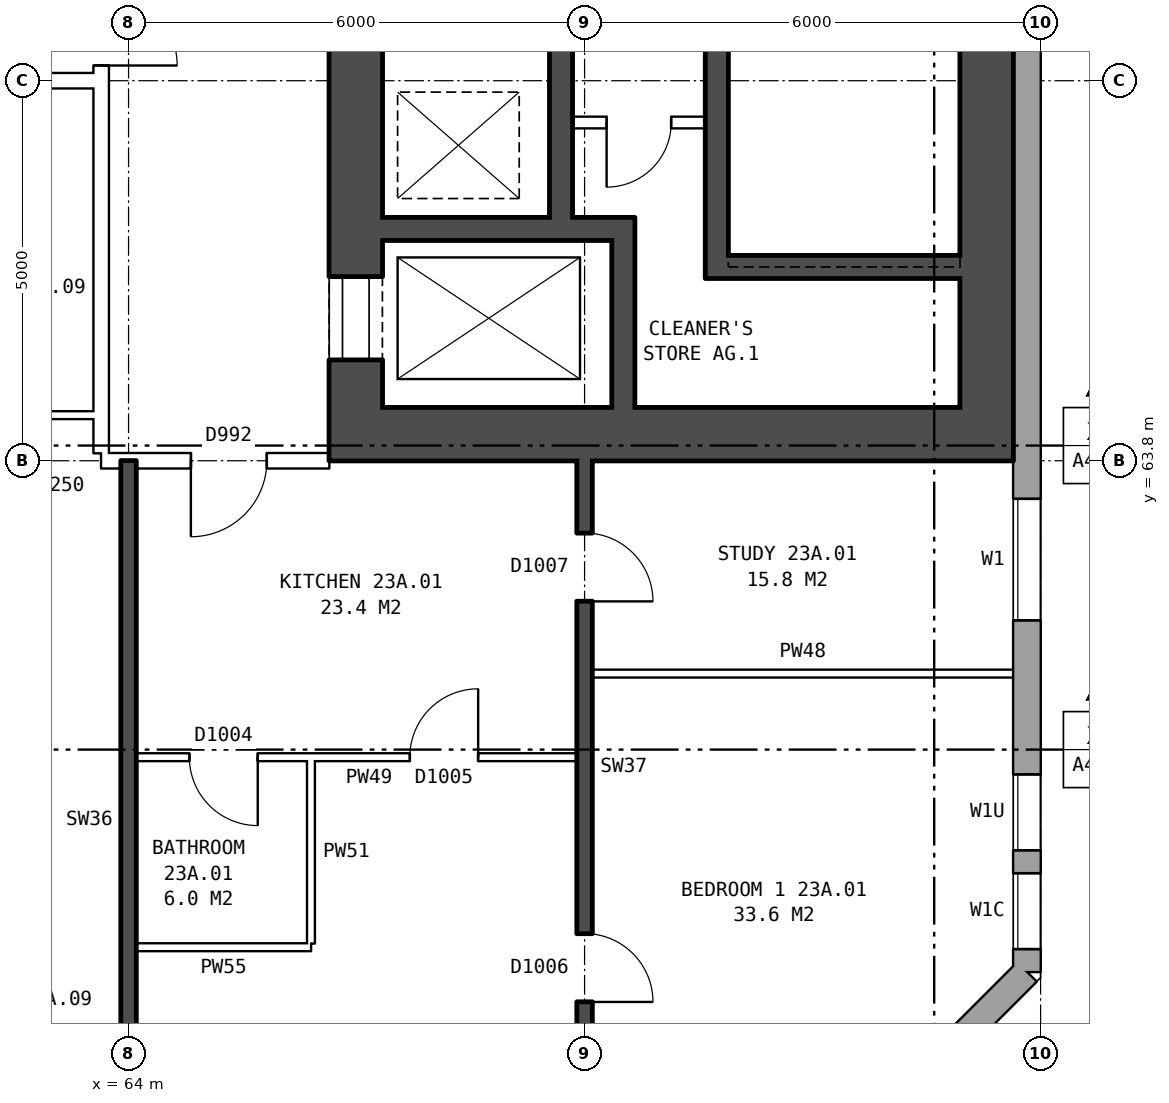
"""IFC4 building model, lengths in metres.
Left out: names, types, materials, properties, quantities, classifications, styles, units other than length and angle.
Written with IfcOpenShell. Run it as: python <this file> out.ifc"""

import sys

from ifc_helpers import new_model, si_unit, direction, frame, frame_2d, origin, place, context, subcontext, project, spatial, rectangle, extrude, element, fill, save


model = new_model("IFC4")
c1 = context("Model", 3, precision=1e-05, world=origin(), true_north=direction((0.0, 1.0)))
c2 = subcontext(c1, "Body", "Model", "MODEL_VIEW")
j1 = project(units=[si_unit("LENGTHUNIT", "METRE"), si_unit("PLANEANGLEUNIT", "RADIAN")], contexts=[c1])
p1 = place(None, origin())
s1 = spatial("IfcSite", under=j1, at=p1, CompositionType="ELEMENT")
p2 = place(p1, origin())
s2 = spatial("IfcBuilding", under=s1, at=p2, CompositionType="ELEMENT")
p3 = place(p2, frame((0.0, 0.0, 84.0)))
s3 = spatial("IfcBuildingStorey", under=s2, at=p3, CompositionType="ELEMENT", Elevation=84.0)
p4 = place(p3, frame((72.925, 54.18, 0.0), z_axis=(0.0, 0.0, 1.0), x_axis=(0.707106781187, 0.707106781187, 0.0)))
e1 = element("IfcWall", 1, at=p4, inside=s3, PredefinedType="STANDARD", context=c2, shape_type="SweptSolid", body=[
    extrude(rectangle(XDim=4.094, YDim=0.36, at=frame_2d((2.047, 0.0))), origin(), (0.0, 0.0, 1.0), 2.85),
])
p5 = place(p4, frame((1.247, 0.0, 0.8)))
e2 = element("IfcOpeningElement", 2, at=p5, cuts=e1, PredefinedType="OPENING", context=c2, shape_type="SweptSolid", body=[
    extrude(rectangle(XDim=1.6, YDim=1.8, at=frame_2d((0.8, 0.9))), frame((0.0, 0.19, 0.0), z_axis=(0.0, -1.0, 0.0), x_axis=(1.0, 0.0, 0.0)), (0.0, 0.0, 1.0), 0.38),
])
p6 = place(p3, frame((75.82, 57.075, 0.0), z_axis=(0.0, 0.0, 1.0), x_axis=(0.0, 1.0, 0.0)))
e3 = element("IfcWall", 3, at=p6, inside=s3, PredefinedType="STANDARD", context=c2, shape_type="SweptSolid", body=[
    extrude(rectangle(XDim=25.851, YDim=0.36, at=frame_2d((12.925, 0.0))), origin(), (0.0, 0.0, 1.0), 2.85),
])
p7 = place(p6, frame((0.3, 0.0, 0.8)))
e4 = element("IfcOpeningElement", 4, at=p7, cuts=e3, PredefinedType="OPENING", context=c2, shape_type="SweptSolid", body=[
    extrude(rectangle(XDim=1.0, YDim=1.8, at=frame_2d((0.5, 0.9))), frame((0.0, 0.19, 0.0), z_axis=(0.0, -1.0, 0.0), x_axis=(1.0, 0.0, 0.0)), (0.0, 0.0, 1.0), 0.38),
])
p8 = place(p6, frame((4.625, 0.0, 0.8)))
e5 = element("IfcOpeningElement", 5, at=p8, cuts=e3, PredefinedType="OPENING", context=c2, shape_type="SweptSolid", body=[
    extrude(rectangle(XDim=1.6, YDim=1.8, at=frame_2d((0.8, 0.9))), frame((0.0, 0.19, 0.0), z_axis=(0.0, -1.0, 0.0), x_axis=(1.0, 0.0, 0.0)), (0.0, 0.0, 1.0), 0.38),
])
p9 = place(p6, frame((19.625, 0.0, 0.8)))
e6 = element("IfcOpeningElement", 6, at=p9, cuts=e3, PredefinedType="OPENING", context=c2, shape_type="SweptSolid", body=[
    extrude(rectangle(XDim=1.6, YDim=1.8, at=frame_2d((0.8, 0.9))), frame((0.0, 0.19, 0.0), z_axis=(0.0, -1.0, 0.0), x_axis=(1.0, 0.0, 0.0)), (0.0, 0.0, 1.0), 0.38),
])
p10 = place(p6, frame((23.125, 0.0, 0.8)))
e7 = element("IfcOpeningElement", 7, at=p10, cuts=e3, PredefinedType="OPENING", context=c2, shape_type="SweptSolid", body=[
    extrude(rectangle(XDim=1.0, YDim=0.9, at=frame_2d((0.5, 0.45))), frame((0.0, 0.19, 0.0), z_axis=(0.0, -1.0, 0.0), x_axis=(1.0, 0.0, 0.0)), (0.0, 0.0, 1.0), 0.38),
])
p11 = place(p6, frame((1.6, 0.0, 0.8)))
e8 = element("IfcOpeningElement", 8, at=p11, cuts=e3, PredefinedType="OPENING", context=c2, shape_type="SweptSolid", body=[
    extrude(rectangle(XDim=1.0, YDim=0.9, at=frame_2d((0.5, 0.45))), frame((0.0, 0.19, 0.0), z_axis=(0.0, -1.0, 0.0), x_axis=(1.0, 0.0, 0.0)), (0.0, 0.0, 1.0), 0.38),
])
p12 = place(p6, frame((24.425, 0.0, 0.8)))
e9 = element("IfcOpeningElement", 9, at=p12, cuts=e3, PredefinedType="OPENING", context=c2, shape_type="SweptSolid", body=[
    extrude(rectangle(XDim=1.0, YDim=1.8, at=frame_2d((0.5, 0.9))), frame((0.0, 0.19, 0.0), z_axis=(0.0, -1.0, 0.0), x_axis=(1.0, 0.0, 0.0)), (0.0, 0.0, 1.0), 0.38),
])
p13 = place(p3, frame((66.99, 64.5, 0.0), z_axis=(0.0, 0.0, 1.0), x_axis=(0.0, 1.0, 0.0)))
e10 = element("IfcWall", 10, at=p13, inside=s3, PredefinedType="SHEAR", context=c2, shape_type="SweptSolid", body=[
    extrude(rectangle(XDim=11.0, YDim=0.7, at=frame_2d((5.5, 0.0))), origin(), (0.0, 0.0, 1.0), 2.85),
])
p14 = place(p13, frame((0.625, 0.0, 0.0)))
e11 = element("IfcOpeningElement", 11, at=p14, cuts=e10, PredefinedType="OPENING", context=c2, shape_type="SweptSolid", body=[
    extrude(rectangle(XDim=1.1, YDim=2.1, at=frame_2d((0.55, 1.05))), frame((0.0, 0.36, 0.0), z_axis=(0.0, -1.0, 0.0), x_axis=(1.0, 0.0, 0.0)), (0.0, 0.0, 1.0), 0.72),
])
p15 = place(p13, frame((9.2, 0.0, 0.0)))
e12 = element("IfcOpeningElement", 12, at=p15, cuts=e10, PredefinedType="OPENING", context=c2, shape_type="SweptSolid", body=[
    extrude(rectangle(XDim=1.1, YDim=2.1, at=frame_2d((0.55, 1.05))), frame((0.0, 0.36, 0.0), z_axis=(0.0, -1.0, 0.0), x_axis=(1.0, 0.0, 0.0)), (0.0, 0.0, 1.0), 0.72),
])
p16 = place(p3, frame((75.29, 64.5, 0.0), z_axis=(0.0, 0.0, 1.0), x_axis=(0.0, 1.0, 0.0)))
e13 = element("IfcWall", 13, at=p16, inside=s3, PredefinedType="SHEAR", context=c2, shape_type="SweptSolid", body=[
    extrude(rectangle(XDim=11.0, YDim=0.7, at=frame_2d((5.5, 0.0))), origin(), (0.0, 0.0, 1.0), 2.85),
])
p17 = place(p3, frame((66.64, 64.15, 0.0), z_axis=(0.0, 0.0, 1.0), x_axis=(1.0, 0.0, 0.0)))
e14 = element("IfcWall", 14, at=p17, inside=s3, PredefinedType="SHEAR", context=c2, shape_type="SweptSolid", body=[
    extrude(rectangle(XDim=9.0, YDim=0.7, at=frame_2d((4.5, 0.0))), origin(), (0.0, 0.0, 1.0), 2.85),
])
p18 = place(p3, frame((71.89, 66.35, 0.0), z_axis=(0.0, 0.0, 1.0), x_axis=(1.0, 0.0, 0.0)))
e15 = element("IfcWall", 15, at=p18, inside=s3, PredefinedType="SHEAR", context=c2, shape_type="SweptSolid", body=[
    extrude(rectangle(XDim=3.05, YDim=0.3, at=frame_2d((1.525, 0.0))), origin(), (0.0, 0.0, 1.0), 2.85),
])
p19 = place(p3, frame((67.34, 66.85, 0.0), z_axis=(0.0, 0.0, 1.0), x_axis=(1.0, 0.0, 0.0)))
e16 = element("IfcWall", 16, at=p19, inside=s3, PredefinedType="SHEAR", context=c2, shape_type="SweptSolid", body=[
    extrude(rectangle(XDim=3.32, YDim=0.3, at=frame_2d((1.66, 0.0))), origin(), (0.0, 0.0, 1.0), 2.85),
])
p20 = place(p3, frame((69.84, 68.25, 0.0), z_axis=(0.0, 0.0, 1.0), x_axis=(1.0, 0.0, 0.0)))
e17 = element("IfcWall", 17, at=p20, inside=s3, PredefinedType="PARTITIONING", context=c2, shape_type="SweptSolid", body=[
    extrude(rectangle(XDim=1.75, YDim=0.15, at=frame_2d((0.875, 0.0))), origin(), (0.0, 0.0, 1.0), 2.85),
])
p21 = place(p20, frame((0.45, 0.0, 0.0)))
e18 = element("IfcOpeningElement", 18, at=p21, cuts=e17, PredefinedType="OPENING", context=c2, shape_type="SweptSolid", body=[
    extrude(rectangle(XDim=0.85, YDim=2.1, at=frame_2d((0.425, 1.05))), frame((0.0, 0.085, 0.0), z_axis=(0.0, -1.0, 0.0), x_axis=(1.0, 0.0, 0.0)), (0.0, 0.0, 1.0), 0.17),
])
p22 = place(p3, frame((69.69, 67.0, 0.0), z_axis=(0.0, 0.0, 1.0), x_axis=(0.0, 1.0, 0.0)))
e19 = element("IfcWall", 19, at=p22, inside=s3, PredefinedType="SHEAR", context=c2, shape_type="SweptSolid", body=[
    extrude(rectangle(XDim=6.6, YDim=0.3, at=frame_2d((3.3, 0.0))), origin(), (0.0, 0.0, 1.0), 2.85),
])
p23 = place(p3, frame((70.51, 64.5, 0.0), z_axis=(0.0, 0.0, 1.0), x_axis=(0.0, 1.0, 0.0)))
e20 = element("IfcWall", 20, at=p23, inside=s3, PredefinedType="SHEAR", context=c2, shape_type="SweptSolid", body=[
    extrude(rectangle(XDim=2.2, YDim=0.3, at=frame_2d((1.1, 0.0))), origin(), (0.0, 0.0, 1.0), 2.85),
])
p24 = place(p3, frame((71.74, 66.2, 0.0), z_axis=(0.0, 0.0, 1.0), x_axis=(0.0, 1.0, 0.0)))
e21 = element("IfcWall", 21, at=p24, inside=s3, PredefinedType="SHEAR", context=c2, shape_type="SweptSolid", body=[
    extrude(rectangle(XDim=7.4, YDim=0.3, at=frame_2d((3.7, 0.0))), origin(), (0.0, 0.0, 1.0), 2.85),
])
p25 = place(p3, frame((63.64, 63.9, 0.0), z_axis=(0.0, 0.0, 1.0), x_axis=(0.0, 1.0, 0.0)))
e22 = element("IfcWall", 22, at=p25, inside=s3, PredefinedType="PARTITIONING", context=c2, shape_type="SweptSolid", body=[
    extrude(rectangle(XDim=12.2, YDim=0.2, at=frame_2d((6.1, 0.0))), origin(), (0.0, 0.0, 1.0), 2.85),
])
p26 = place(p25, frame((5.1, 0.0, 0.0)))
e23 = element("IfcOpeningElement", 23, at=p26, cuts=e22, PredefinedType="OPENING", context=c2, shape_type="SweptSolid", body=[
    extrude(rectangle(XDim=2.0, YDim=2.1, at=frame_2d((1.0, 1.05))), frame((0.0, 0.11, 0.0), z_axis=(0.0, -1.0, 0.0), x_axis=(1.0, 0.0, 0.0)), (0.0, 0.0, 1.0), 0.22),
])
p27 = place(p3, frame((64.1, 57.4, 0.0), z_axis=(0.0, 0.0, 1.0), x_axis=(1.0, 0.0, 0.0)))
e24 = element("IfcWall", 24, at=p27, inside=s3, PredefinedType="PARTITIONING", context=c2, shape_type="SweptSolid", body=[
    extrude(rectangle(XDim=2.3, YDim=0.1, at=frame_2d((1.15, 0.0))), origin(), (0.0, 0.0, 1.0), 2.85),
])
p28 = place(p3, frame((64.1, 59.9, 0.0), z_axis=(0.0, 0.0, 1.0), x_axis=(1.0, 0.0, 0.0)))
e25 = element("IfcWall", 25, at=p28, inside=s3, PredefinedType="PARTITIONING", context=c2, shape_type="SweptSolid", body=[
    extrude(rectangle(XDim=5.8, YDim=0.1, at=frame_2d((2.9, 0.0))), origin(), (0.0, 0.0, 1.0), 2.85),
])
p29 = place(p28, frame((3.6, 0.0, 0.0)))
e26 = element("IfcOpeningElement", 26, at=p29, cuts=e25, PredefinedType="OPENING", context=c2, shape_type="SweptSolid", body=[
    extrude(rectangle(XDim=0.9, YDim=2.1, at=frame_2d((0.45, 1.05))), frame((0.0, 0.06, 0.0), z_axis=(0.0, -1.0, 0.0), x_axis=(1.0, 0.0, 0.0)), (0.0, 0.0, 1.0), 0.12),
])
p30 = place(p28, frame((0.7, 0.0, 0.0)))
e27 = element("IfcOpeningElement", 27, at=p30, cuts=e25, PredefinedType="OPENING", context=c2, shape_type="SweptSolid", body=[
    extrude(rectangle(XDim=0.9, YDim=2.1, at=frame_2d((0.45, 1.05))), frame((0.0, 0.06, 0.0), z_axis=(0.0, -1.0, 0.0), x_axis=(1.0, 0.0, 0.0)), (0.0, 0.0, 1.0), 0.12),
])
p31 = place(p3, frame((70.1, 61.0, 0.0), z_axis=(0.0, 0.0, 1.0), x_axis=(1.0, 0.0, 0.0)))
e28 = element("IfcWall", 28, at=p31, inside=s3, PredefinedType="PARTITIONING", context=c2, shape_type="SweptSolid", body=[
    extrude(rectangle(XDim=5.54, YDim=0.1, at=frame_2d((2.77, 0.0))), origin(), (0.0, 0.0, 1.0), 2.85),
])
p32 = place(p3, frame((63.64, 63.8, 0.0), z_axis=(0.0, 0.0, 1.0), x_axis=(1.0, 0.0, 0.0)))
e29 = element("IfcWall", 29, at=p32, inside=s3, PredefinedType="PARTITIONING", context=c2, shape_type="SweptSolid", body=[
    extrude(rectangle(XDim=3.0, YDim=0.2, at=frame_2d((1.5, 0.0))), origin(), (0.0, 0.0, 1.0), 2.85),
])
p33 = place(p32, frame((1.18, 0.0, 0.0)))
e30 = element("IfcOpeningElement", 30, at=p33, cuts=e29, PredefinedType="OPENING", context=c2, shape_type="SweptSolid", body=[
    extrude(rectangle(XDim=1.0, YDim=2.1, at=frame_2d((0.5, 1.05))), frame((0.0, 0.11, 0.0), z_axis=(0.0, -1.0, 0.0), x_axis=(1.0, 0.0, 0.0)), (0.0, 0.0, 1.0), 0.22),
])
p34 = place(p3, frame((61.0, 64.4, 0.0), z_axis=(0.0, 0.0, 1.0), x_axis=(1.0, 0.0, 0.0)))
e31 = element("IfcWall", 31, at=p34, inside=s3, PredefinedType="PARTITIONING", context=c2, shape_type="SweptSolid", body=[
    extrude(rectangle(XDim=2.64, YDim=0.1, at=frame_2d((1.32, 0.0))), origin(), (0.0, 0.0, 1.0), 2.85),
])
p35 = place(p3, frame((44.36, 68.8, 0.0), z_axis=(0.0, 0.0, 1.0), x_axis=(1.0, 0.0, 0.0)))
e32 = element("IfcWall", 32, at=p35, inside=s3, PredefinedType="PARTITIONING", context=c2, shape_type="SweptSolid", body=[
    extrude(rectangle(XDim=19.28, YDim=0.2, at=frame_2d((9.64, 0.0))), origin(), (0.0, 0.0, 1.0), 2.85),
])
p36 = place(p35, frame((14.64, 0.0, 0.0)))
e33 = element("IfcOpeningElement", 33, at=p36, cuts=e32, PredefinedType="OPENING", context=c2, shape_type="SweptSolid", body=[
    extrude(rectangle(XDim=1.0, YDim=2.1, at=frame_2d((0.5, 1.05))), frame((0.0, 0.11, 0.0), z_axis=(0.0, -1.0, 0.0), x_axis=(1.0, 0.0, 0.0)), (0.0, 0.0, 1.0), 0.22),
])
p37 = place(p35, frame((11.64, 0.0, 0.0)))
e34 = element("IfcOpeningElement", 34, at=p37, cuts=e32, PredefinedType="OPENING", context=c2, shape_type="SweptSolid", body=[
    extrude(rectangle(XDim=1.0, YDim=2.1, at=frame_2d((0.5, 1.05))), frame((0.0, 0.11, 0.0), z_axis=(0.0, -1.0, 0.0), x_axis=(1.0, 0.0, 0.0)), (0.0, 0.0, 1.0), 0.22),
])
p38 = place(p35, frame((2.64, 0.0, 0.0)))
e35 = element("IfcOpeningElement", 35, at=p38, cuts=e32, PredefinedType="OPENING", context=c2, shape_type="SweptSolid", body=[
    extrude(rectangle(XDim=1.0, YDim=2.1, at=frame_2d((0.5, 1.05))), frame((0.0, 0.11, 0.0), z_axis=(0.0, -1.0, 0.0), x_axis=(1.0, 0.0, 0.0)), (0.0, 0.0, 1.0), 0.22),
])
p39 = place(p3, frame((64.0, 54.36, 0.0), z_axis=(0.0, 0.0, 1.0), x_axis=(0.0, 1.0, 0.0)))
e36 = element("IfcWall", 36, at=p39, inside=s3, PredefinedType="SOLIDWALL", context=c2, shape_type="SweptSolid", body=[
    extrude(rectangle(XDim=9.44, YDim=0.2, at=frame_2d((4.72, 0.0))), origin(), (0.0, 0.0, 1.0), 2.85),
])
p40 = place(p3, frame((66.4, 57.45, 0.0), z_axis=(0.0, 0.0, 1.0), x_axis=(0.0, 1.0, 0.0)))
e37 = element("IfcWall", 37, at=p40, inside=s3, PredefinedType="PARTITIONING", context=c2, shape_type="SweptSolid", body=[
    extrude(rectangle(XDim=2.4, YDim=0.1, at=frame_2d((1.2, 0.0))), origin(), (0.0, 0.0, 1.0), 2.85),
])
p41 = place(p3, frame((70.0, 54.36, 0.0), z_axis=(0.0, 0.0, 1.0), x_axis=(0.0, 1.0, 0.0)))
e38 = element("IfcWall", 38, at=p41, inside=s3, PredefinedType="SOLIDWALL", context=c2, shape_type="SweptSolid", body=[
    extrude(rectangle(XDim=9.44, YDim=0.2, at=frame_2d((4.72, 0.0))), origin(), (0.0, 0.0, 1.0), 2.85),
])
p42 = place(p41, frame((2.32, 0.0, 0.0)))
e39 = element("IfcOpeningElement", 39, at=p42, cuts=e38, PredefinedType="OPENING", context=c2, shape_type="SweptSolid", body=[
    extrude(rectangle(XDim=0.9, YDim=2.1, at=frame_2d((0.45, 1.05))), frame((0.0, 0.11, 0.0), z_axis=(0.0, -1.0, 0.0), x_axis=(1.0, 0.0, 0.0)), (0.0, 0.0, 1.0), 0.22),
])
p43 = place(p41, frame((7.59, 0.0, 0.0)))
e40 = element("IfcOpeningElement", 40, at=p43, cuts=e38, PredefinedType="OPENING", context=c2, shape_type="SweptSolid", body=[
    extrude(rectangle(XDim=0.9, YDim=2.1, at=frame_2d((0.45, 1.05))), frame((0.0, 0.11, 0.0), z_axis=(0.0, -1.0, 0.0), x_axis=(1.0, 0.0, 0.0)), (0.0, 0.0, 1.0), 0.22),
])
p44 = place(p7, origin())
e41 = element("IfcWindow", 41, at=p44, inside=s3, PartitioningType="SINGLE_PANEL", PredefinedType="WINDOW", context=c2, shape_type="SweptSolid", body=[
    extrude(rectangle(XDim=1.0, YDim=1.8, at=frame_2d((0.5, 0.9))), frame((0.0, 0.15, 0.0), z_axis=(0.0, -1.0, 0.0), x_axis=(1.0, 0.0, 0.0)), (0.0, 0.0, 1.0), 0.06),
])
fill(e4, e41)
p45 = place(p8, origin())
e42 = element("IfcWindow", 42, at=p45, inside=s3, PartitioningType="SINGLE_PANEL", PredefinedType="WINDOW", context=c2, shape_type="SweptSolid", body=[
    extrude(rectangle(XDim=1.6, YDim=1.8, at=frame_2d((0.8, 0.9))), frame((0.0, 0.15, 0.0), z_axis=(0.0, -1.0, 0.0), x_axis=(1.0, 0.0, 0.0)), (0.0, 0.0, 1.0), 0.06),
])
fill(e5, e42)
p46 = place(p14, origin())
e43 = element("IfcDoor", 43, at=p46, inside=s3, OperationType="DOUBLE_DOOR_SLIDING", PredefinedType="DOOR", context=c2, shape_type="SweptSolid", body=[
    extrude(rectangle(XDim=1.1, YDim=2.1, at=frame_2d((0.55, 1.05))), frame((0.0, -0.285, 0.0), z_axis=(0.0, -1.0, 0.0), x_axis=(1.0, 0.0, 0.0)), (0.0, 0.0, 1.0), 0.05),
])
fill(e11, e43)
p47 = place(p21, frame((0.85, 0.0, 0.0), z_axis=(0.0, 0.0, 1.0), x_axis=(-1.0, 0.0, 0.0)))
e44 = element("IfcDoor", 44, at=p47, inside=s3, OperationType="SINGLE_SWING_RIGHT", PredefinedType="DOOR", context=c2, shape_type="SweptSolid", body=[
    extrude(rectangle(XDim=0.85, YDim=2.1, at=frame_2d((0.425, 1.05))), frame((0.0, 0.025, 0.0), z_axis=(0.0, -1.0, 0.0), x_axis=(1.0, 0.0, 0.0)), (0.0, 0.0, 1.0), 0.05),
])
fill(e18, e44)
p48 = place(p26, frame((2.0, 0.0, 0.0), z_axis=(0.0, 0.0, 1.0), x_axis=(-1.0, 0.0, 0.0)))
e45 = element("IfcDoor", 45, at=p48, inside=s3, OperationType="DOUBLE_DOOR_SINGLE_SWING", PredefinedType="DOOR", context=c2, shape_type="SweptSolid", body=[
    extrude(rectangle(XDim=2.0, YDim=2.1, at=frame_2d((1.0, 1.05))), frame((0.0, 0.025, 0.0), z_axis=(0.0, -1.0, 0.0), x_axis=(1.0, 0.0, 0.0)), (0.0, 0.0, 1.0), 0.05),
])
fill(e23, e45)
p49 = place(p42, frame((0.9, 0.0, 0.0), z_axis=(0.0, 0.0, 1.0), x_axis=(-1.0, 0.0, 0.0)))
e46 = element("IfcDoor", 46, at=p49, inside=s3, OperationType="SINGLE_SWING_RIGHT", PredefinedType="DOOR", context=c2, shape_type="SweptSolid", body=[
    extrude(rectangle(XDim=0.9, YDim=2.1, at=frame_2d((0.45, 1.05))), frame((0.0, 0.025, 0.0), z_axis=(0.0, -1.0, 0.0), x_axis=(1.0, 0.0, 0.0)), (0.0, 0.0, 1.0), 0.05),
])
fill(e39, e46)
p50 = place(p43, frame((0.9, 0.0, 0.0), z_axis=(0.0, 0.0, 1.0), x_axis=(-1.0, 0.0, 0.0)))
e47 = element("IfcDoor", 47, at=p50, inside=s3, OperationType="SINGLE_SWING_RIGHT", PredefinedType="DOOR", context=c2, shape_type="SweptSolid", body=[
    extrude(rectangle(XDim=0.9, YDim=2.1, at=frame_2d((0.45, 1.05))), frame((0.0, 0.025, 0.0), z_axis=(0.0, -1.0, 0.0), x_axis=(1.0, 0.0, 0.0)), (0.0, 0.0, 1.0), 0.05),
])
fill(e40, e47)
p51 = place(p33, frame((1.0, 0.0, 0.0), z_axis=(0.0, 0.0, 1.0), x_axis=(-1.0, 0.0, 0.0)))
e48 = element("IfcDoor", 48, at=p51, inside=s3, OperationType="SINGLE_SWING_RIGHT", PredefinedType="DOOR", context=c2, shape_type="SweptSolid", body=[
    extrude(rectangle(XDim=1.0, YDim=2.1, at=frame_2d((0.5, 1.05))), frame((0.0, 0.025, 0.0), z_axis=(0.0, -1.0, 0.0), x_axis=(1.0, 0.0, 0.0)), (0.0, 0.0, 1.0), 0.05),
])
fill(e30, e48)
p52 = place(p29, origin())
e49 = element("IfcDoor", 49, at=p52, inside=s3, OperationType="SINGLE_SWING_RIGHT", PredefinedType="DOOR", context=c2, shape_type="SweptSolid", body=[
    extrude(rectangle(XDim=0.9, YDim=2.1, at=frame_2d((0.45, 1.05))), frame((0.0, 0.025, 0.0), z_axis=(0.0, -1.0, 0.0), x_axis=(1.0, 0.0, 0.0)), (0.0, 0.0, 1.0), 0.05),
])
fill(e26, e49)
p53 = place(p30, frame((0.9, 0.0, 0.0), z_axis=(0.0, 0.0, 1.0), x_axis=(-1.0, 0.0, 0.0)))
e50 = element("IfcDoor", 50, at=p53, inside=s3, OperationType="SINGLE_SWING_LEFT", PredefinedType="DOOR", context=c2, shape_type="SweptSolid", body=[
    extrude(rectangle(XDim=0.9, YDim=2.1, at=frame_2d((0.45, 1.05))), frame((0.0, 0.025, 0.0), z_axis=(0.0, -1.0, 0.0), x_axis=(1.0, 0.0, 0.0)), (0.0, 0.0, 1.0), 0.05),
])
fill(e27, e50)
p54 = place(p11, origin())
e51 = element("IfcWindow", 51, at=p54, inside=s3, PartitioningType="SINGLE_PANEL", PredefinedType="WINDOW", context=c2, shape_type="SweptSolid", body=[
    extrude(rectangle(XDim=1.0, YDim=0.9, at=frame_2d((0.5, 0.45))), frame((0.0, 0.15, 0.0), z_axis=(0.0, -1.0, 0.0), x_axis=(1.0, 0.0, 0.0)), (0.0, 0.0, 1.0), 0.06),
])
fill(e8, e51)
save(model, sys.argv[1])
